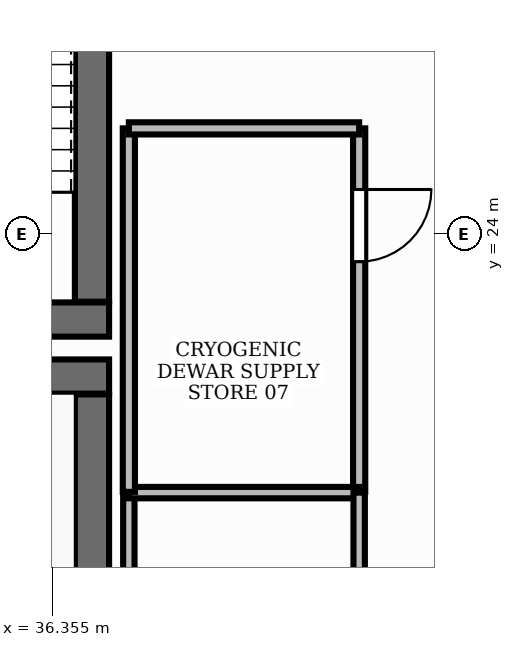
"""IFC4 building model, lengths in metres.
Left out: names, types, materials, properties, quantities, classifications, styles, units other than length and angle.
Written with IfcOpenShell. Run it as: python <this file> out.ifc"""

import sys

from ifc_helpers import new_model, si_unit, direction, frame, frame_2d, origin, place, context, subcontext, project, spatial, rectangle, extrude, element, fill, save


model = new_model("IFC4")
c1 = context("Model", 3, precision=1e-05, world=origin(), true_north=direction((0.0, 1.0)))
c2 = subcontext(c1, "Body", "Model", "MODEL_VIEW")
j1 = project(units=[si_unit("LENGTHUNIT", "METRE"), si_unit("PLANEANGLEUNIT", "RADIAN")], contexts=[c1])
p1 = place(None, origin())
s1 = spatial("IfcSite", under=j1, at=p1, CompositionType="ELEMENT")
p2 = place(p1, origin())
s2 = spatial("IfcBuilding", under=s1, at=p2, CompositionType="ELEMENT")
p3 = place(p2, frame((0.0, 0.0, 38.4)))
s3 = spatial("IfcBuildingStorey", under=s2, at=p3, CompositionType="ELEMENT", Elevation=38.4)
p4 = place(p3, frame((28.35, 22.125, 0.0), z_axis=(0.0, 0.0, 1.0), x_axis=(1.0, 0.0, 0.0)))
e1 = element("IfcWall", 1, at=p4, inside=s3, PredefinedType="SHEAR", context=c2, shape_type="SweptSolid", body=[
    extrude(rectangle(XDim=8.75, YDim=0.45, at=frame_2d((4.375, 0.0))), origin(), (0.0, 0.0, 1.0), 3.9),
])
p5 = place(p3, frame((36.875, 18.81, 0.0), z_axis=(0.0, 0.0, 1.0), x_axis=(0.0, 1.0, 0.0)))
e2 = element("IfcWall", 2, at=p5, inside=s3, PredefinedType="SHEAR", context=c2, shape_type="SweptSolid", body=[
    extrude(rectangle(XDim=3.08, YDim=0.45, at=frame_2d((1.54, 0.0))), origin(), (0.0, 0.0, 1.0), 3.9),
])
p6 = place(p3, frame((33.1, 22.875, 0.0), z_axis=(0.0, 0.0, 1.0), x_axis=(1.0, 0.0, 0.0)))
e3 = element("IfcWall", 3, at=p6, inside=s3, PredefinedType="SHEAR", context=c2, shape_type="SweptSolid", body=[
    extrude(rectangle(XDim=4.0, YDim=0.45, at=frame_2d((2.0, 0.0))), origin(), (0.0, 0.0, 1.0), 3.9),
])
p7 = place(p3, frame((36.875, 23.11, 0.0), z_axis=(0.0, 0.0, 1.0), x_axis=(0.0, 1.0, 0.0)))
e4 = element("IfcWall", 4, at=p7, inside=s3, PredefinedType="SHEAR", context=c2, shape_type="SweptSolid", body=[
    extrude(rectangle(XDim=7.78, YDim=0.45, at=frame_2d((3.89, 0.0))), origin(), (0.0, 0.0, 1.0), 3.9),
])
p8 = place(p3, frame((40.39, 25.39, 0.0), z_axis=(0.0, 0.0, 1.0), x_axis=(0.0, -1.0, 0.0)))
e5 = element("IfcWall", 5, at=p8, inside=s3, PredefinedType="PARTITIONING", context=c2, shape_type="SweptSolid", body=[
    extrude(rectangle(XDim=4.782, YDim=0.16, at=frame_2d((2.391, 0.0))), origin(), (0.0, 0.0, 1.0), 2.91),
])
p9 = place(p8, frame((0.804, 0.0, 0.0)))
e6 = element("IfcOpeningElement", 6, at=p9, cuts=e5, PredefinedType="OPENING", context=c2, shape_type="SweptSolid", body=[
    extrude(rectangle(XDim=0.95, YDim=2.15, at=frame_2d((0.475, 1.075))), frame((0.0, 0.095, 0.0), z_axis=(0.0, -1.0, 0.0), x_axis=(1.0, 0.0, 0.0)), (0.0, 0.0, 1.0), 0.19),
])
p10 = place(p3, frame((37.36, 18.1, 0.0), z_axis=(0.0, 0.0, 1.0), x_axis=(0.0, 1.0, 0.0)))
e7 = element("IfcWall", 7, at=p10, inside=s3, PredefinedType="PARTITIONING", context=c2, shape_type="SweptSolid", body=[
    extrude(rectangle(XDim=2.498, YDim=0.15, at=frame_2d((1.249, 0.0))), origin(), (0.0, 0.0, 1.0), 2.91),
])
p11 = place(p3, frame((37.36, 20.598, 0.0), z_axis=(0.0, 0.0, 1.0), x_axis=(1.0, 0.0, 0.0)))
e8 = element("IfcWall", 8, at=p11, inside=s3, PredefinedType="PARTITIONING", context=c2, shape_type="SweptSolid", body=[
    extrude(rectangle(XDim=3.03, YDim=0.15, at=frame_2d((1.515, 0.0))), origin(), (0.0, 0.0, 1.0), 2.91),
])
p12 = place(p3, frame((40.39, 20.598, 0.0), z_axis=(0.0, 0.0, 1.0), x_axis=(0.0, -1.0, 0.0)))
e9 = element("IfcWall", 9, at=p12, inside=s3, PredefinedType="PARTITIONING", context=c2, shape_type="SweptSolid", body=[
    extrude(rectangle(XDim=4.098, YDim=0.15, at=frame_2d((2.049, 0.0))), origin(), (0.0, 0.0, 1.0), 2.91),
])
p13 = place(p3, frame((37.36, 20.608, 0.0), z_axis=(0.0, 0.0, 1.0), x_axis=(0.0, 1.0, 0.0)))
e10 = element("IfcWall", 10, at=p13, inside=s3, PredefinedType="PARTITIONING", context=c2, shape_type="SweptSolid", body=[
    extrude(rectangle(XDim=4.782, YDim=0.16, at=frame_2d((2.391, 0.0))), origin(), (0.0, 0.0, 1.0), 2.91),
])
p14 = place(p3, frame((37.36, 25.39, 0.0), z_axis=(0.0, 0.0, 1.0), x_axis=(1.0, 0.0, 0.0)))
e11 = element("IfcWall", 11, at=p14, inside=s3, PredefinedType="PARTITIONING", context=c2, shape_type="SweptSolid", body=[
    extrude(rectangle(XDim=3.03, YDim=0.16, at=frame_2d((1.515, 0.0))), origin(), (0.0, 0.0, 1.0), 2.91),
])
p15 = place(p9, origin())
e12 = element("IfcDoor", 12, at=p15, inside=s3, OperationType="SINGLE_SWING_LEFT", PredefinedType="DOOR", context=c2, shape_type="SweptSolid", body=[
    extrude(rectangle(XDim=0.95, YDim=2.15, at=frame_2d((0.475, 1.075))), frame((0.0, 0.025, 0.0), z_axis=(0.0, -1.0, 0.0), x_axis=(1.0, 0.0, 0.0)), (0.0, 0.0, 1.0), 0.05),
])
fill(e6, e12)
save(model, sys.argv[1])
